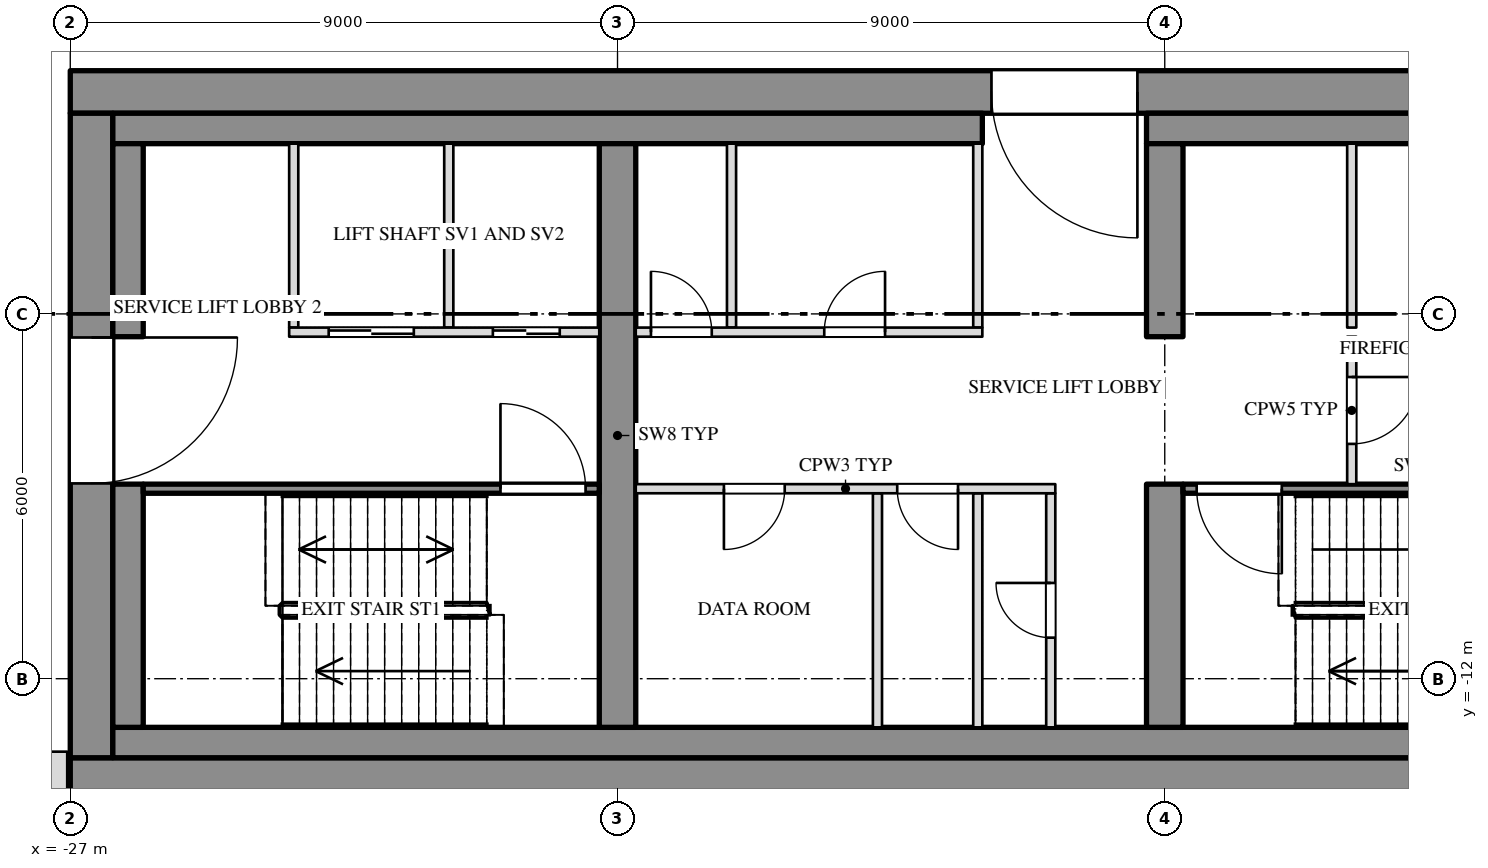
"""IFC4 building model, lengths in metres.
Left out: names, types, materials, properties, quantities, classifications, styles, units other than length and angle.
Written with IfcOpenShell. Run it as: python <this file> out.ifc"""

import sys

from ifc_helpers import new_model, si_unit, direction, frame, frame_2d, origin, place, context, subcontext, project, spatial, rectangle, extrude, element, fill, save


model = new_model("IFC4")
c1 = context("Model", 3, precision=1e-05, world=origin(), true_north=direction((0.0, 1.0)))
c2 = subcontext(c1, "Body", "Model", "MODEL_VIEW")
j1 = project(units=[si_unit("LENGTHUNIT", "METRE"), si_unit("PLANEANGLEUNIT", "RADIAN")], contexts=[c1])
p1 = place(None, origin())
s1 = spatial("IfcSite", under=j1, at=p1, CompositionType="ELEMENT")
p2 = place(p1, origin())
s2 = spatial("IfcBuilding", under=s1, at=p2, CompositionType="ELEMENT")
p3 = place(p2, frame((0.0, 0.0, 260.5)))
s3 = spatial("IfcBuildingStorey", under=s2, at=p3, CompositionType="ELEMENT", Elevation=260.5)
p4 = place(p3, frame((-27.0, -2.35, 0.0), z_axis=(0.0, 0.0, 1.0), x_axis=(1.0, 0.0, 0.0)))
e1 = element("IfcWall", 1, at=p4, inside=s3, PredefinedType="SHEAR", context=c2, shape_type="SweptSolid", body=[
    extrude(rectangle(XDim=54.0, YDim=0.7, at=frame_2d((27.0, 0.0))), origin(), (0.0, 0.0, 1.0), 3.7),
])
p5 = place(p4, frame((15.15, 0.0, 0.0)))
e2 = element("IfcOpeningElement", 2, at=p5, cuts=e1, PredefinedType="OPENING", context=c2, shape_type="SweptSolid", body=[
    extrude(rectangle(XDim=2.4, YDim=2.1, at=frame_2d((1.2, 1.05))), frame((0.0, 0.362, 0.0), z_axis=(0.0, -1.0, 0.0), x_axis=(1.0, 0.0, 0.0)), (0.0, 0.0, 1.0), 0.724),
])
p6 = place(p4, frame((36.45, 0.0, 0.0)))
e3 = element("IfcOpeningElement", 3, at=p6, cuts=e1, PredefinedType="OPENING", context=c2, shape_type="SweptSolid", body=[
    extrude(rectangle(XDim=2.4, YDim=2.1, at=frame_2d((1.2, 1.05))), frame((0.0, 0.362, 0.0), z_axis=(0.0, -1.0, 0.0), x_axis=(1.0, 0.0, 0.0)), (0.0, 0.0, 1.0), 0.724),
])
p7 = place(p3, frame((-27.0, -13.65, 0.0), z_axis=(0.0, 0.0, 1.0), x_axis=(1.0, 0.0, 0.0)))
e4 = element("IfcWall", 4, at=p7, inside=s3, PredefinedType="SHEAR", context=c2, shape_type="SweptSolid", body=[
    extrude(rectangle(XDim=54.0, YDim=0.7, at=frame_2d((27.0, 0.0))), origin(), (0.0, 0.0, 1.0), 3.7),
])
p8 = place(p3, frame((-26.65, -13.3, 0.0), z_axis=(0.0, 0.0, 1.0), x_axis=(0.0, 1.0, 0.0)))
e5 = element("IfcWall", 5, at=p8, inside=s3, PredefinedType="SHEAR", context=c2, shape_type="SweptSolid", body=[
    extrude(rectangle(XDim=10.6, YDim=0.7, at=frame_2d((5.3, 0.0))), origin(), (0.0, 0.0, 1.0), 3.7),
])
p9 = place(p8, frame((4.512, 0.0, 0.0)))
e6 = element("IfcOpeningElement", 6, at=p9, cuts=e5, PredefinedType="OPENING", context=c2, shape_type="SweptSolid", body=[
    extrude(rectangle(XDim=2.4, YDim=2.1, at=frame_2d((1.2, 1.05))), frame((0.0, 0.362, 0.0), z_axis=(0.0, -1.0, 0.0), x_axis=(1.0, 0.0, 0.0)), (0.0, 0.0, 1.0), 0.724),
])
p10 = place(p3, frame((-26.3, -2.95, 0.0), z_axis=(0.0, 0.0, 1.0), x_axis=(1.0, 0.0, 0.0)))
e7 = element("IfcWall", 7, at=p10, inside=s3, PredefinedType="SHEAR", context=c2, shape_type="SweptSolid", body=[
    extrude(rectangle(XDim=14.3, YDim=0.5, at=frame_2d((7.15, 0.0))), origin(), (0.0, 0.0, 1.0), 3.7),
])
p11 = place(p3, frame((-9.3, -2.95, 0.0), z_axis=(0.0, 0.0, 1.0), x_axis=(1.0, 0.0, 0.0)))
e8 = element("IfcWall", 8, at=p11, inside=s3, PredefinedType="SHEAR", context=c2, shape_type="SweptSolid", body=[
    extrude(rectangle(XDim=18.6, YDim=0.5, at=frame_2d((9.3, 0.0))), origin(), (0.0, 0.0, 1.0), 3.7),
])
p12 = place(p3, frame((-26.3, -13.05, 0.0), z_axis=(0.0, 0.0, 1.0), x_axis=(1.0, 0.0, 0.0)))
e9 = element("IfcWall", 9, at=p12, inside=s3, PredefinedType="SHEAR", context=c2, shape_type="SweptSolid", body=[
    extrude(rectangle(XDim=52.6, YDim=0.5, at=frame_2d((26.3, 0.0))), origin(), (0.0, 0.0, 1.0), 3.7),
])
p13 = place(p3, frame((-26.05, -12.8, 0.0), z_axis=(0.0, 0.0, 1.0), x_axis=(0.0, 1.0, 0.0)))
e10 = element("IfcWall", 10, at=p13, inside=s3, PredefinedType="SHEAR", context=c2, shape_type="SweptSolid", body=[
    extrude(rectangle(XDim=4.0, YDim=0.5, at=frame_2d((2.0, 0.0))), origin(), (0.0, 0.0, 1.0), 3.7),
])
p14 = place(p3, frame((-26.05, -6.375, 0.0), z_axis=(0.0, 0.0, 1.0), x_axis=(0.0, 1.0, 0.0)))
e11 = element("IfcWall", 11, at=p14, inside=s3, PredefinedType="SHEAR", context=c2, shape_type="SweptSolid", body=[
    extrude(rectangle(XDim=3.175, YDim=0.5, at=frame_2d((1.587, 0.0))), origin(), (0.0, 0.0, 1.0), 3.7),
])
p15 = place(p3, frame((-18.0, -12.8, 0.0), z_axis=(0.0, 0.0, 1.0), x_axis=(0.0, 1.0, 0.0)))
e12 = element("IfcWall", 12, at=p15, inside=s3, PredefinedType="SHEAR", context=c2, shape_type="SweptSolid", body=[
    extrude(rectangle(XDim=9.6, YDim=0.6, at=frame_2d((4.8, 0.0))), origin(), (0.0, 0.0, 1.0), 3.7),
])
p16 = place(p3, frame((-9.0, -12.8, 0.0), z_axis=(0.0, 0.0, 1.0), x_axis=(0.0, 1.0, 0.0)))
e13 = element("IfcWall", 13, at=p16, inside=s3, PredefinedType="SHEAR", context=c2, shape_type="SweptSolid", body=[
    extrude(rectangle(XDim=4.0, YDim=0.6, at=frame_2d((2.0, 0.0))), origin(), (0.0, 0.0, 1.0), 3.7),
])
p17 = place(p3, frame((-9.0, -6.375, 0.0), z_axis=(0.0, 0.0, 1.0), x_axis=(0.0, 1.0, 0.0)))
e14 = element("IfcWall", 14, at=p17, inside=s3, PredefinedType="SHEAR", context=c2, shape_type="SweptSolid", body=[
    extrude(rectangle(XDim=3.175, YDim=0.6, at=frame_2d((1.587, 0.0))), origin(), (0.0, 0.0, 1.0), 3.7),
])
p18 = place(p3, frame((-29.948, -13.6, 0.0), z_axis=(0.0, 0.0, 1.0), x_axis=(1.0, 0.0, 0.0)))
e15 = element("IfcWall", 15, at=p18, inside=s3, PredefinedType="SOLIDWALL", context=c2, shape_type="SweptSolid", body=[
    extrude(rectangle(XDim=2.897, YDim=0.8, at=frame_2d((1.449, 0.0))), origin(), (0.0, 0.0, 1.0), 3.7),
])
for number, where, z_axis, x_axis in (
    (16, (-20.775, -6.225, 0.0), (0.0, 0.0, 1.0), (0.0, 1.0, 0.0)),
    (17, (-23.325, -6.225, 0.0), (0.0, 0.0, 1.0), (0.0, 1.0, 0.0)),
    (18, (-12.075, -6.225, 0.0), (0.0, 0.0, 1.0), (0.0, 1.0, 0.0)),
    (19, (-16.125, -6.225, 0.0), (0.0, 0.0, 1.0), (0.0, 1.0, 0.0)),
    (20, (-5.925, -6.225, 0.0), (0.0, 0.0, 1.0), (0.0, 1.0, 0.0)),
):
    element("IfcWall", number, at=place(p3, frame(where, z_axis=z_axis, x_axis=x_axis)), inside=s3, PredefinedType="PARTITIONING", context=c2, shape_type="SweptSolid", body=[
        extrude(rectangle(XDim=3.025, YDim=0.15, at=frame_2d((1.513, 0.0))), origin(), (0.0, 0.0, 1.0), 3.7),
    ])
p19 = place(p3, frame((-10.875, -12.8, 0.0), z_axis=(0.0, 0.0, 1.0), x_axis=(0.0, 1.0, 0.0)))
e21 = element("IfcWall", 21, at=p19, inside=s3, PredefinedType="PARTITIONING", context=c2, shape_type="SweptSolid", body=[
    extrude(rectangle(XDim=3.85, YDim=0.15, at=frame_2d((1.925, 0.0))), origin(), (0.0, 0.0, 1.0), 3.7),
])
p20 = place(p19, frame((1.475, 0.0, 0.0)))
e22 = element("IfcOpeningElement", 22, at=p20, cuts=e21, PredefinedType="OPENING", context=c2, shape_type="SweptSolid", body=[
    extrude(rectangle(XDim=0.9, YDim=2.1, at=frame_2d((0.45, 1.05))), frame((0.0, 0.087, 0.0), z_axis=(0.0, -1.0, 0.0), x_axis=(1.0, 0.0, 0.0)), (0.0, 0.0, 1.0), 0.174),
])
for number, where, z_axis, x_axis in (
    (23, (-12.075, -12.8, 0.0), (0.0, 0.0, 1.0), (0.0, 1.0, 0.0)),
    (24, (-13.725, -12.8, 0.0), (0.0, 0.0, 1.0), (0.0, 1.0, 0.0)),
):
    element("IfcWall", number, at=place(p3, frame(where, z_axis=z_axis, x_axis=x_axis)), inside=s3, PredefinedType="PARTITIONING", context=c2, shape_type="SweptSolid", body=[
        extrude(rectangle(XDim=3.85, YDim=0.15, at=frame_2d((1.925, 0.0))), origin(), (0.0, 0.0, 1.0), 3.7),
    ])
p21 = place(p3, frame((-5.925, -8.8, 0.0), z_axis=(0.0, 0.0, 1.0), x_axis=(0.0, 1.0, 0.0)))
e25 = element("IfcWall", 25, at=p21, inside=s3, PredefinedType="PARTITIONING", context=c2, shape_type="SweptSolid", body=[
    extrude(rectangle(XDim=2.425, YDim=0.15, at=frame_2d((1.212, 0.0))), origin(), (0.0, 0.0, 1.0), 3.7),
])
p22 = place(p21, frame((0.662, 0.0, 0.0)))
e26 = element("IfcOpeningElement", 26, at=p22, cuts=e25, PredefinedType="OPENING", context=c2, shape_type="SweptSolid", body=[
    extrude(rectangle(XDim=1.1, YDim=2.1, at=frame_2d((0.55, 1.05))), frame((0.0, 0.087, 0.0), z_axis=(0.0, -1.0, 0.0), x_axis=(1.0, 0.0, 0.0)), (0.0, 0.0, 1.0), 0.174),
])
p23 = place(p3, frame((-23.4, -6.3, 0.0), z_axis=(0.0, 0.0, 1.0), x_axis=(1.0, 0.0, 0.0)))
e27 = element("IfcWall", 27, at=p23, inside=s3, PredefinedType="PARTITIONING", context=c2, shape_type="SweptSolid", body=[
    extrude(rectangle(XDim=5.1, YDim=0.15, at=frame_2d((2.55, 0.0))), origin(), (0.0, 0.0, 1.0), 3.7),
])
p24 = place(p23, frame((0.65, 0.0, 0.0)))
e28 = element("IfcOpeningElement", 28, at=p24, cuts=e27, PredefinedType="OPENING", context=c2, shape_type="SweptSolid", body=[
    extrude(rectangle(XDim=1.4, YDim=2.1, at=frame_2d((0.7, 1.05))), frame((0.0, 0.087, 0.0), z_axis=(0.0, -1.0, 0.0), x_axis=(1.0, 0.0, 0.0)), (0.0, 0.0, 1.0), 0.174),
])
p25 = place(p23, frame((3.35, 0.0, 0.0)))
e29 = element("IfcOpeningElement", 29, at=p25, cuts=e27, PredefinedType="OPENING", context=c2, shape_type="SweptSolid", body=[
    extrude(rectangle(XDim=1.1, YDim=2.1, at=frame_2d((0.55, 1.05))), frame((0.0, 0.087, 0.0), z_axis=(0.0, -1.0, 0.0), x_axis=(1.0, 0.0, 0.0)), (0.0, 0.0, 1.0), 0.174),
])
p26 = place(p3, frame((-17.7, -6.3, 0.0), z_axis=(0.0, 0.0, 1.0), x_axis=(1.0, 0.0, 0.0)))
e30 = element("IfcWall", 30, at=p26, inside=s3, PredefinedType="PARTITIONING", context=c2, shape_type="SweptSolid", body=[
    extrude(rectangle(XDim=5.7, YDim=0.15, at=frame_2d((2.85, 0.0))), origin(), (0.0, 0.0, 1.0), 3.7),
])
p27 = place(p26, frame((0.25, 0.0, 0.0)))
e31 = element("IfcOpeningElement", 31, at=p27, cuts=e30, PredefinedType="OPENING", context=c2, shape_type="SweptSolid", body=[
    extrude(rectangle(XDim=1.0, YDim=2.1, at=frame_2d((0.5, 1.05))), frame((0.0, 0.087, 0.0), z_axis=(0.0, -1.0, 0.0), x_axis=(1.0, 0.0, 0.0)), (0.0, 0.0, 1.0), 0.174),
])
p28 = place(p26, frame((3.1, 0.0, 0.0)))
e32 = element("IfcOpeningElement", 32, at=p28, cuts=e30, PredefinedType="OPENING", context=c2, shape_type="SweptSolid", body=[
    extrude(rectangle(XDim=1.0, YDim=2.1, at=frame_2d((0.5, 1.05))), frame((0.0, 0.087, 0.0), z_axis=(0.0, -1.0, 0.0), x_axis=(1.0, 0.0, 0.0)), (0.0, 0.0, 1.0), 0.174),
])
p29 = place(p3, frame((-25.8, -8.875, 0.0), z_axis=(0.0, 0.0, 1.0), x_axis=(1.0, 0.0, 0.0)))
e33 = element("IfcWall", 33, at=p29, inside=s3, PredefinedType="SHEAR", context=c2, shape_type="SweptSolid", body=[
    extrude(rectangle(XDim=7.5, YDim=0.15, at=frame_2d((3.75, 0.0))), origin(), (0.0, 0.0, 1.0), 3.7),
])
p30 = place(p29, frame((5.875, 0.0, 0.0)))
e34 = element("IfcOpeningElement", 34, at=p30, cuts=e33, PredefinedType="OPENING", context=c2, shape_type="SweptSolid", body=[
    extrude(rectangle(XDim=1.4, YDim=2.1, at=frame_2d((0.7, 1.05))), frame((0.0, 0.087, 0.0), z_axis=(0.0, -1.0, 0.0), x_axis=(1.0, 0.0, 0.0)), (0.0, 0.0, 1.0), 0.174),
])
p31 = place(p3, frame((-17.7, -8.875, 0.0), z_axis=(0.0, 0.0, 1.0), x_axis=(1.0, 0.0, 0.0)))
e35 = element("IfcWall", 35, at=p31, inside=s3, PredefinedType="PARTITIONING", context=c2, shape_type="SweptSolid", body=[
    extrude(rectangle(XDim=6.9, YDim=0.15, at=frame_2d((3.45, 0.0))), origin(), (0.0, 0.0, 1.0), 3.7),
])
p32 = place(p31, frame((1.45, 0.0, 0.0)))
e36 = element("IfcOpeningElement", 36, at=p32, cuts=e35, PredefinedType="OPENING", context=c2, shape_type="SweptSolid", body=[
    extrude(rectangle(XDim=1.0, YDim=2.1, at=frame_2d((0.5, 1.05))), frame((0.0, 0.087, 0.0), z_axis=(0.0, -1.0, 0.0), x_axis=(1.0, 0.0, 0.0)), (0.0, 0.0, 1.0), 0.174),
])
p33 = place(p31, frame((4.3, 0.0, 0.0)))
e37 = element("IfcOpeningElement", 37, at=p33, cuts=e35, PredefinedType="OPENING", context=c2, shape_type="SweptSolid", body=[
    extrude(rectangle(XDim=1.0, YDim=2.1, at=frame_2d((0.5, 1.05))), frame((0.0, 0.087, 0.0), z_axis=(0.0, -1.0, 0.0), x_axis=(1.0, 0.0, 0.0)), (0.0, 0.0, 1.0), 0.174),
])
p34 = place(p3, frame((-8.7, -8.875, 0.0), z_axis=(0.0, 0.0, 1.0), x_axis=(1.0, 0.0, 0.0)))
e38 = element("IfcWall", 38, at=p34, inside=s3, PredefinedType="SHEAR", context=c2, shape_type="SweptSolid", body=[
    extrude(rectangle(XDim=8.4, YDim=0.15, at=frame_2d((4.2, 0.0))), origin(), (0.0, 0.0, 1.0), 3.7),
])
p35 = place(p34, frame((0.225, 0.0, 0.0)))
e39 = element("IfcOpeningElement", 39, at=p35, cuts=e38, PredefinedType="OPENING", context=c2, shape_type="SweptSolid", body=[
    extrude(rectangle(XDim=1.4, YDim=2.1, at=frame_2d((0.7, 1.05))), frame((0.0, 0.087, 0.0), z_axis=(0.0, -1.0, 0.0), x_axis=(1.0, 0.0, 0.0)), (0.0, 0.0, 1.0), 0.174),
])
p36 = place(p9, origin())
e40 = element("IfcDoor", 40, at=p36, inside=s3, OperationType="DOUBLE_DOOR_SINGLE_SWING", PredefinedType="DOOR", context=c2, shape_type="SweptSolid", body=[
    extrude(rectangle(XDim=2.4, YDim=2.1, at=frame_2d((1.2, 1.05))), frame((0.0, 0.025, 0.0), z_axis=(0.0, -1.0, 0.0), x_axis=(1.0, 0.0, 0.0)), (0.0, 0.0, 1.0), 0.05),
])
fill(e6, e40)
p37 = place(p24, origin())
e41 = element("IfcDoor", 41, at=p37, inside=s3, OperationType="SLIDING_TO_RIGHT", PredefinedType="DOOR", context=c2, shape_type="SweptSolid", body=[
    extrude(rectangle(XDim=1.4, YDim=2.1, at=frame_2d((0.7, 1.05))), frame((0.0, 0.025, 0.0), z_axis=(0.0, -1.0, 0.0), x_axis=(1.0, 0.0, 0.0)), (0.0, 0.0, 1.0), 0.05),
])
fill(e28, e41)
p38 = place(p25, origin())
e42 = element("IfcDoor", 42, at=p38, inside=s3, OperationType="SLIDING_TO_LEFT", PredefinedType="DOOR", context=c2, shape_type="SweptSolid", body=[
    extrude(rectangle(XDim=1.1, YDim=2.1, at=frame_2d((0.55, 1.05))), frame((0.0, 0.025, 0.0), z_axis=(0.0, -1.0, 0.0), x_axis=(1.0, 0.0, 0.0)), (0.0, 0.0, 1.0), 0.05),
])
fill(e29, e42)
p39 = place(p30, origin())
e43 = element("IfcDoor", 43, at=p39, inside=s3, OperationType="DOUBLE_DOOR_SINGLE_SWING", PredefinedType="DOOR", context=c2, shape_type="SweptSolid", body=[
    extrude(rectangle(XDim=1.4, YDim=2.1, at=frame_2d((0.7, 1.05))), frame((0.0, 0.025, 0.0), z_axis=(0.0, -1.0, 0.0), x_axis=(1.0, 0.0, 0.0)), (0.0, 0.0, 1.0), 0.05),
])
fill(e34, e43)
p40 = place(p27, origin())
e44 = element("IfcDoor", 44, at=p40, inside=s3, OperationType="SINGLE_SWING_LEFT", PredefinedType="DOOR", context=c2, shape_type="SweptSolid", body=[
    extrude(rectangle(XDim=1.0, YDim=2.1, at=frame_2d((0.5, 1.05))), frame((0.0, 0.025, 0.0), z_axis=(0.0, -1.0, 0.0), x_axis=(1.0, 0.0, 0.0)), (0.0, 0.0, 1.0), 0.05),
])
fill(e31, e44)
p41 = place(p32, origin())
e45 = element("IfcDoor", 45, at=p41, inside=s3, OperationType="SINGLE_SWING_RIGHT", PredefinedType="DOOR", context=c2, shape_type="SweptSolid", body=[
    extrude(rectangle(XDim=1.0, YDim=2.1, at=frame_2d((0.5, 1.05))), frame((0.0, 0.025, 0.0), z_axis=(0.0, -1.0, 0.0), x_axis=(1.0, 0.0, 0.0)), (0.0, 0.0, 1.0), 0.05),
])
fill(e36, e45)
p42 = place(p28, origin())
e46 = element("IfcDoor", 46, at=p42, inside=s3, OperationType="SINGLE_SWING_RIGHT", PredefinedType="DOOR", context=c2, shape_type="SweptSolid", body=[
    extrude(rectangle(XDim=1.0, YDim=2.1, at=frame_2d((0.5, 1.05))), frame((0.0, 0.025, 0.0), z_axis=(0.0, -1.0, 0.0), x_axis=(1.0, 0.0, 0.0)), (0.0, 0.0, 1.0), 0.05),
])
fill(e32, e46)
p43 = place(p33, origin())
e47 = element("IfcDoor", 47, at=p43, inside=s3, OperationType="SINGLE_SWING_LEFT", PredefinedType="DOOR", context=c2, shape_type="SweptSolid", body=[
    extrude(rectangle(XDim=1.0, YDim=2.1, at=frame_2d((0.5, 1.05))), frame((0.0, 0.025, 0.0), z_axis=(0.0, -1.0, 0.0), x_axis=(1.0, 0.0, 0.0)), (0.0, 0.0, 1.0), 0.05),
])
fill(e37, e47)
p44 = place(p20, origin())
e48 = element("IfcDoor", 48, at=p44, inside=s3, OperationType="SINGLE_SWING_RIGHT", PredefinedType="DOOR", context=c2, shape_type="SweptSolid", body=[
    extrude(rectangle(XDim=0.9, YDim=2.1, at=frame_2d((0.45, 1.05))), frame((0.0, 0.025, 0.0), z_axis=(0.0, -1.0, 0.0), x_axis=(1.0, 0.0, 0.0)), (0.0, 0.0, 1.0), 0.05),
])
fill(e22, e48)
p45 = place(p5, origin())
e49 = element("IfcDoor", 49, at=p45, inside=s3, OperationType="DOUBLE_DOOR_SINGLE_SWING", PredefinedType="DOOR", context=c2, shape_type="SweptSolid", body=[
    extrude(rectangle(XDim=2.4, YDim=2.1, at=frame_2d((1.2, 1.05))), frame((0.0, 0.025, 0.0), z_axis=(0.0, -1.0, 0.0), x_axis=(1.0, 0.0, 0.0)), (0.0, 0.0, 1.0), 0.05),
])
fill(e2, e49)
p46 = place(p35, origin())
e50 = element("IfcDoor", 50, at=p46, inside=s3, OperationType="DOUBLE_DOOR_SINGLE_SWING", PredefinedType="DOOR", context=c2, shape_type="SweptSolid", body=[
    extrude(rectangle(XDim=1.4, YDim=2.1, at=frame_2d((0.7, 1.05))), frame((0.0, 0.025, 0.0), z_axis=(0.0, -1.0, 0.0), x_axis=(1.0, 0.0, 0.0)), (0.0, 0.0, 1.0), 0.05),
])
fill(e39, e50)
p47 = place(p22, origin())
e51 = element("IfcDoor", 51, at=p47, inside=s3, OperationType="SINGLE_SWING_LEFT", PredefinedType="DOOR", context=c2, shape_type="SweptSolid", body=[
    extrude(rectangle(XDim=1.1, YDim=2.1, at=frame_2d((0.55, 1.05))), frame((0.0, 0.025, 0.0), z_axis=(0.0, -1.0, 0.0), x_axis=(1.0, 0.0, 0.0)), (0.0, 0.0, 1.0), 0.05),
])
fill(e26, e51)
save(model, sys.argv[1])
